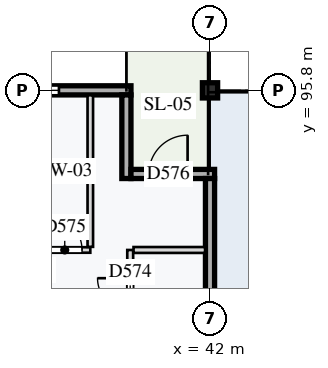
"""IFC4 building model, lengths in metres.
Left out: names, types, materials, properties, quantities, classifications, styles, units other than length and angle.
Written with IfcOpenShell. Run it as: python <this file> out.ifc"""

import sys

from ifc_helpers import new_model, si_unit, direction, frame, frame_2d, origin, origin_2d, place, context, subcontext, project, spatial, rectangle, extrude, element, fill, save


model = new_model("IFC4")
c1 = context("Model", 3, precision=1e-05, world=origin(), true_north=direction((0.0, 1.0)))
c2 = subcontext(c1, "Body", "Model", "MODEL_VIEW")
j1 = project(units=[si_unit("LENGTHUNIT", "METRE"), si_unit("PLANEANGLEUNIT", "RADIAN")], contexts=[c1])
p1 = place(None, origin())
s1 = spatial("IfcSite", under=j1, at=p1, CompositionType="ELEMENT")
p2 = place(p1, origin())
s2 = spatial("IfcBuilding", under=s1, at=p2, CompositionType="ELEMENT")
p3 = place(p2, frame((0.0, 0.0, 56.4)))
s3 = spatial("IfcBuildingStorey", under=s2, at=p3, CompositionType="ELEMENT", Elevation=56.4)
p4 = place(p3, frame((42.0, 95.8, 0.0), z_axis=(0.0, 0.0, 1.0), x_axis=(1.0, 0.0, 0.0)))
e1 = element("IfcColumn", 1, at=p4, inside=s3, PredefinedType="COLUMN", context=c2, shape_type="SweptSolid", body=[
    extrude(rectangle(XDim=0.4, YDim=0.4, at=origin_2d()), origin(), (0.0, 0.0, 1.0), 3.2),
])
p5 = place(p3, frame((35.6, 95.8, 0.0), z_axis=(0.0, 0.0, 1.0), x_axis=(1.0, 0.0, 0.0)))
e2 = element("IfcWall", 2, at=p5, inside=s3, PredefinedType="STANDARD", context=c2, shape_type="SweptSolid", body=[
    extrude(rectangle(XDim=4.32, YDim=0.24, at=frame_2d((2.16, 0.0))), origin(), (0.0, 0.0, 1.0), 2.65),
])
p6 = place(p5, frame((0.625, 0.0, 0.85)))
e3 = element("IfcOpeningElement", 3, at=p6, cuts=e2, PredefinedType="OPENING", context=c2, shape_type="SweptSolid", body=[
    extrude(rectangle(XDim=1.8, YDim=1.35, at=frame_2d((0.9, 0.675))), frame((0.0, 0.13, 0.0), z_axis=(0.0, -1.0, 0.0), x_axis=(1.0, 0.0, 0.0)), (0.0, 0.0, 1.0), 0.26),
])
p7 = place(p3, frame((39.8, 95.68, 0.0), z_axis=(0.0, 0.0, 1.0), x_axis=(0.0, -1.0, 0.0)))
e4 = element("IfcWall", 4, at=p7, inside=s3, PredefinedType="STANDARD", context=c2, shape_type="SweptSolid", body=[
    extrude(rectangle(XDim=2.2, YDim=0.24, at=frame_2d((1.1, 0.0))), origin(), (0.0, 0.0, 1.0), 2.93),
])
p8 = place(p3, frame((39.92, 93.6, 0.0), z_axis=(0.0, 0.0, 1.0), x_axis=(1.0, 0.0, 0.0)))
e5 = element("IfcWall", 5, at=p8, inside=s3, PredefinedType="STANDARD", context=c2, shape_type="SweptSolid", body=[
    extrude(rectangle(XDim=2.2, YDim=0.24, at=frame_2d((1.1, 0.0))), origin(), (0.0, 0.0, 1.0), 2.93),
])
p9 = place(p8, frame((0.47, 0.0, 0.0)))
e6 = element("IfcOpeningElement", 6, at=p9, cuts=e5, PredefinedType="OPENING", context=c2, shape_type="SweptSolid", body=[
    extrude(rectangle(XDim=1.02, YDim=2.16, at=frame_2d((0.51, 1.08))), frame((0.0, 0.13, 0.0), z_axis=(0.0, -1.0, 0.0), x_axis=(1.0, 0.0, 0.0)), (0.0, 0.0, 1.0), 0.26),
])
p10 = place(p3, frame((42.0, 89.4, 0.0), z_axis=(0.0, 0.0, 1.0), x_axis=(0.0, 1.0, 0.0)))
e7 = element("IfcWall", 7, at=p10, inside=s3, PredefinedType="STANDARD", context=c2, shape_type="SweptSolid", body=[
    extrude(rectangle(XDim=4.08, YDim=0.24, at=frame_2d((2.04, 0.0))), origin(), (0.0, 0.0, 1.0), 2.65),
])
p11 = place(p3, frame((39.9, 89.298, 0.0), z_axis=(0.0, 0.0, 1.0), x_axis=(0.0, 1.0, 0.0)))
e8 = element("IfcWall", 8, at=p11, inside=s3, PredefinedType="PARTITIONING", context=c2, shape_type="SweptSolid", body=[
    extrude(rectangle(XDim=2.302, YDim=0.155, at=frame_2d((1.151, 0.0))), origin(), (0.0, 0.0, 1.0), 2.93),
])
p12 = place(p11, frame((0.7, 0.0, 0.0)))
e9 = element("IfcOpeningElement", 9, at=p12, cuts=e8, PredefinedType="OPENING", context=c2, shape_type="SweptSolid", body=[
    extrude(rectangle(XDim=0.86, YDim=2.12, at=frame_2d((0.43, 1.06))), frame((0.0, 0.087, 0.0), z_axis=(0.0, -1.0, 0.0), x_axis=(1.0, 0.0, 0.0)), (0.0, 0.0, 1.0), 0.175),
])
p13 = place(p3, frame((39.988, 91.6, 0.0), z_axis=(0.0, 0.0, 1.0), x_axis=(1.0, 0.0, 0.0)))
e10 = element("IfcWall", 10, at=p13, inside=s3, PredefinedType="PARTITIONING", context=c2, shape_type="SweptSolid", body=[
    extrude(rectangle(XDim=1.883, YDim=0.155, at=frame_2d((0.941, 0.0))), origin(), (0.0, 0.0, 1.0), 2.93),
])
p14 = place(p3, frame((37.373, 91.6, 0.0), z_axis=(0.0, 0.0, 1.0), x_axis=(1.0, 0.0, 0.0)))
e11 = element("IfcWall", 11, at=p14, inside=s3, PredefinedType="PARTITIONING", context=c2, shape_type="SweptSolid", body=[
    extrude(rectangle(XDim=1.478, YDim=0.145, at=frame_2d((0.739, 0.0))), origin(), (0.0, 0.0, 1.0), 2.93),
])
p15 = place(p14, frame((0.35, 0.0, 0.0)))
e12 = element("IfcOpeningElement", 12, at=p15, cuts=e11, PredefinedType="OPENING", context=c2, shape_type="SweptSolid", body=[
    extrude(rectangle(XDim=0.91, YDim=2.14, at=frame_2d((0.455, 1.07))), frame((0.0, 0.083, 0.0), z_axis=(0.0, -1.0, 0.0), x_axis=(1.0, 0.0, 0.0)), (0.0, 0.0, 1.0), 0.165),
])
p16 = place(p3, frame((38.85, 91.683, 0.0), z_axis=(0.0, 0.0, 1.0), x_axis=(0.0, 1.0, 0.0)))
e13 = element("IfcWall", 13, at=p16, inside=s3, PredefinedType="PARTITIONING", context=c2, shape_type="SweptSolid", body=[
    extrude(rectangle(XDim=3.987, YDim=0.145, at=frame_2d((1.994, 0.0))), origin(), (0.0, 0.0, 1.0), 2.93),
])
p17 = place(p6, origin())
e14 = element("IfcWindow", 14, at=p17, inside=s3, PartitioningType="SINGLE_PANEL", PredefinedType="WINDOW", context=c2, shape_type="SweptSolid", body=[
    extrude(rectangle(XDim=1.8, YDim=1.35, at=frame_2d((0.9, 0.675))), frame((0.0, 0.03, 0.0), z_axis=(0.0, -1.0, 0.0), x_axis=(1.0, 0.0, 0.0)), (0.0, 0.0, 1.0), 0.06),
])
fill(e3, e14)
p18 = place(p9, origin())
e15 = element("IfcDoor", 15, at=p18, inside=s3, OperationType="SINGLE_SWING_RIGHT", PredefinedType="DOOR", context=c2, shape_type="SweptSolid", body=[
    extrude(rectangle(XDim=1.02, YDim=2.16, at=frame_2d((0.51, 1.08))), frame((0.0, 0.025, 0.0), z_axis=(0.0, -1.0, 0.0), x_axis=(1.0, 0.0, 0.0)), (0.0, 0.0, 1.0), 0.05),
])
fill(e6, e15)
p19 = place(p12, origin())
e16 = element("IfcDoor", 16, at=p19, inside=s3, OperationType="SINGLE_SWING_RIGHT", PredefinedType="DOOR", context=c2, shape_type="SweptSolid", body=[
    extrude(rectangle(XDim=0.86, YDim=2.12, at=frame_2d((0.43, 1.06))), frame((0.0, 0.025, 0.0), z_axis=(0.0, -1.0, 0.0), x_axis=(1.0, 0.0, 0.0)), (0.0, 0.0, 1.0), 0.05),
])
fill(e9, e16)
p20 = place(p15, origin())
e17 = element("IfcDoor", 17, at=p20, inside=s3, OperationType="SINGLE_SWING_LEFT", PredefinedType="DOOR", context=c2, shape_type="SweptSolid", body=[
    extrude(rectangle(XDim=0.91, YDim=2.14, at=frame_2d((0.455, 1.07))), frame((0.0, 0.025, 0.0), z_axis=(0.0, -1.0, 0.0), x_axis=(1.0, 0.0, 0.0)), (0.0, 0.0, 1.0), 0.05),
])
fill(e12, e17)
save(model, sys.argv[1])
